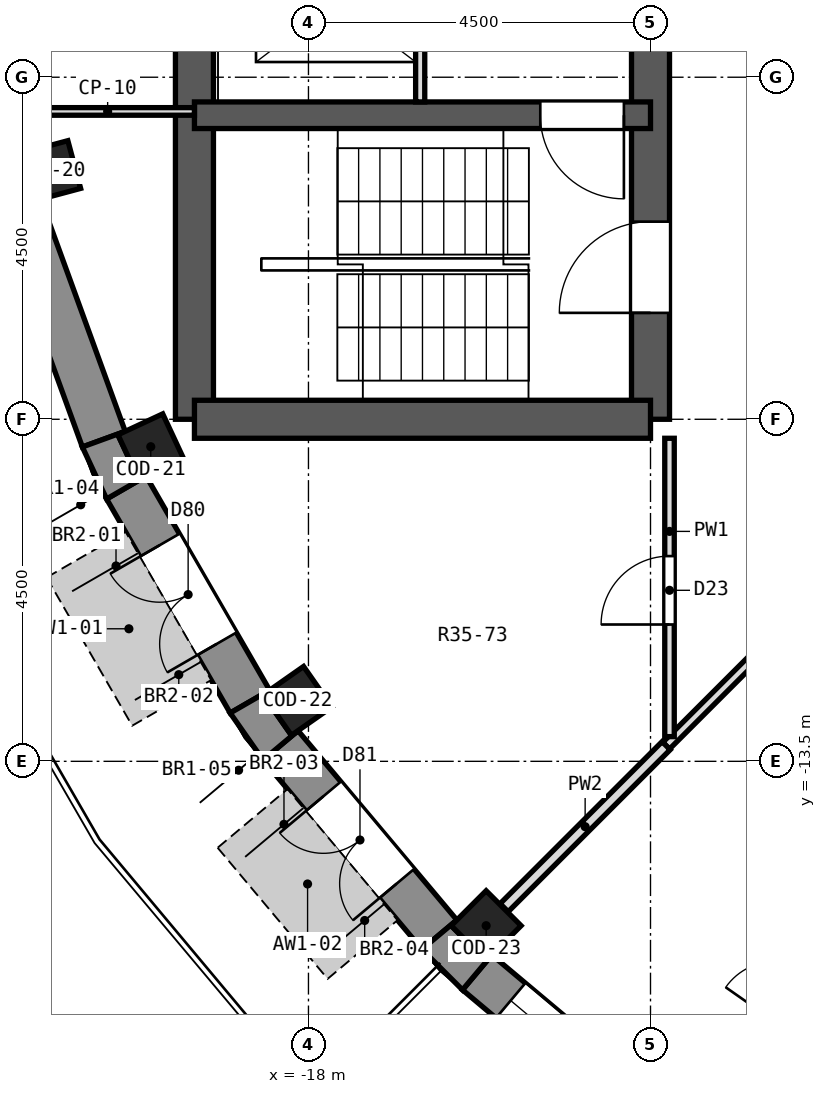
"""IFC4 building model, lengths in metres.
Left out: names, types, materials, properties, quantities, classifications, styles, units other than length and angle.
Written with IfcOpenShell. Run it as: python <this file> out.ifc"""

import sys

from ifc_helpers import new_model, si_unit, direction, frame, frame_2d, origin, origin_2d, place, context, subcontext, project, spatial, polyline, rectangle, outline, extrude, element, fill, save


model = new_model("IFC4")
c1 = context("Model", 3, precision=1e-05, world=origin(), true_north=direction((0.0, 1.0)))
c2 = subcontext(c1, "Body", "Model", "MODEL_VIEW")
j1 = project(units=[si_unit("LENGTHUNIT", "METRE"), si_unit("PLANEANGLEUNIT", "RADIAN")], contexts=[c1])
p1 = place(None, origin())
s1 = spatial("IfcSite", under=j1, at=p1, CompositionType="ELEMENT")
p2 = place(p1, origin())
s2 = spatial("IfcBuilding", under=s1, at=p2, CompositionType="ELEMENT")
p3 = place(p2, frame((0.0, 0.0, 249.5)))
s3 = spatial("IfcBuildingStorey", under=s2, at=p3, CompositionType="ELEMENT", Elevation=249.5)
for number, where, z_axis, x_axis in (
    (1, (-21.395, -5.733, 0.0), (0.0, 0.0, 1.0), (-0.966, -0.259, 0.0)),
    (2, (-20.075, -9.361, 0.0), (0.0, 0.0, 1.0), (-0.906, -0.423, 0.0)),
    (3, (-18.144, -12.705, 0.0), (0.0, 0.0, 1.0), (-0.819, -0.574, 0.0)),
    (4, (-15.662, -15.662, 0.0), (0.0, 0.0, 1.0), (-0.707, -0.707, 0.0)),
):
    element("IfcColumn", number, at=place(p3, frame(where, z_axis=z_axis, x_axis=x_axis)), inside=s3, PredefinedType="COLUMN", context=c2, shape_type="SweptSolid", body=[
        extrude(rectangle(XDim=0.65, YDim=0.65, at=origin_2d()), origin(), (0.0, 0.0, 1.0), 3.3),
    ])
p4 = place(p3, frame((-13.5, -9.0, 0.0), z_axis=(0.0, 0.0, 1.0), x_axis=(0.0, 1.0, 0.0)))
e5 = element("IfcWall", 5, at=p4, inside=s3, PredefinedType="SHEAR", context=c2, shape_type="SweptSolid", body=[
    extrude(rectangle(XDim=18.0, YDim=0.5, at=frame_2d((9.0, 0.0))), origin(), (0.0, 0.0, 1.0), 3.3),
])
p5 = place(p4, frame((15.4, 0.0, 0.0)))
e6 = element("IfcOpeningElement", 6, at=p5, cuts=e5, PredefinedType="OPENING", context=c2, shape_type="SweptSolid", body=[
    extrude(rectangle(XDim=1.2, YDim=2.1, at=frame_2d((0.6, 1.05))), frame((0.0, 0.262, 0.0), z_axis=(0.0, -1.0, 0.0), x_axis=(1.0, 0.0, 0.0)), (0.0, 0.0, 1.0), 0.524),
])
p6 = place(p4, frame((1.4, 0.0, 0.0)))
e7 = element("IfcOpeningElement", 7, at=p6, cuts=e5, PredefinedType="OPENING", context=c2, shape_type="SweptSolid", body=[
    extrude(rectangle(XDim=1.2, YDim=2.1, at=frame_2d((0.6, 1.05))), frame((0.0, 0.262, 0.0), z_axis=(0.0, -1.0, 0.0), x_axis=(1.0, 0.0, 0.0)), (0.0, 0.0, 1.0), 0.524),
])
p7 = place(p4, frame((7.5, 0.0, 0.0)))
e8 = element("IfcOpeningElement", 8, at=p7, cuts=e5, PredefinedType="OPENING", context=c2, shape_type="SweptSolid", body=[
    extrude(rectangle(XDim=3.0, YDim=2.4, at=frame_2d((1.5, 1.2))), frame((0.0, 0.262, 0.0), z_axis=(0.0, -1.0, 0.0), x_axis=(1.0, 0.0, 0.0)), (0.0, 0.0, 1.0), 0.524),
])
p8 = place(p3, frame((-19.5, -9.0, 0.0), z_axis=(0.0, 0.0, 1.0), x_axis=(0.0, 1.0, 0.0)))
e9 = element("IfcWall", 9, at=p8, inside=s3, PredefinedType="SHEAR", context=c2, shape_type="SweptSolid", body=[
    extrude(rectangle(XDim=18.0, YDim=0.5, at=frame_2d((9.0, 0.0))), origin(), (0.0, 0.0, 1.0), 3.3),
])
p9 = place(p8, frame((9.45, 0.0, 0.0)))
e10 = element("IfcOpeningElement", 10, at=p9, cuts=e9, PredefinedType="OPENING", context=c2, shape_type="SweptSolid", body=[
    extrude(rectangle(XDim=0.9, YDim=2.1, at=frame_2d((0.45, 1.05))), frame((0.0, 0.262, 0.0), z_axis=(0.0, -1.0, 0.0), x_axis=(1.0, 0.0, 0.0)), (0.0, 0.0, 1.0), 0.524),
])
p10 = place(p8, frame((7.65, 0.0, 0.0)))
e11 = element("IfcOpeningElement", 11, at=p10, cuts=e9, PredefinedType="OPENING", context=c2, shape_type="SweptSolid", body=[
    extrude(rectangle(XDim=0.9, YDim=2.1, at=frame_2d((0.45, 1.05))), frame((0.0, 0.262, 0.0), z_axis=(0.0, -1.0, 0.0), x_axis=(1.0, 0.0, 0.0)), (0.0, 0.0, 1.0), 0.524),
])
p11 = place(p3, frame((-13.5, -9.0, 0.0), z_axis=(0.0, 0.0, 1.0), x_axis=(-1.0, 0.0, 0.0)))
e12 = element("IfcWall", 12, at=p11, inside=s3, PredefinedType="SHEAR", context=c2, shape_type="SweptSolid", body=[
    extrude(rectangle(XDim=6.0, YDim=0.5, at=frame_2d((3.0, 0.0))), origin(), (0.0, 0.0, 1.0), 3.3),
])
p12 = place(p3, frame((-13.5, -5.0, 0.0), z_axis=(0.0, 0.0, 1.0), x_axis=(-1.0, 0.0, 0.0)))
e13 = element("IfcWall", 13, at=p12, inside=s3, PredefinedType="SHEAR", context=c2, shape_type="SweptSolid", body=[
    extrude(rectangle(XDim=6.0, YDim=0.35, at=frame_2d((3.0, 0.0))), origin(), (0.0, 0.0, 1.0), 3.3),
])
p13 = place(p12, frame((0.35, 0.0, 0.0)))
e14 = element("IfcOpeningElement", 14, at=p13, cuts=e13, PredefinedType="OPENING", context=c2, shape_type="SweptSolid", body=[
    extrude(rectangle(XDim=1.1, YDim=2.1, at=frame_2d((0.55, 1.05))), frame((0.0, 0.187, 0.0), z_axis=(0.0, -1.0, 0.0), x_axis=(1.0, 0.0, 0.0)), (0.0, 0.0, 1.0), 0.374),
])
p14 = place(p3, frame((-21.805, -6.206, 0.0), z_axis=(0.0, 0.0, 1.0), x_axis=(0.342056509473, -0.939679383794, 0.0)))
e15 = element("IfcWall", 15, at=p14, inside=s3, PredefinedType="SOLIDWALL", context=c2, shape_type="SweptSolid", body=[
    extrude(rectangle(XDim=3.252, YDim=0.6, at=frame_2d((1.626, 0.0))), origin(), (0.0, 0.0, 1.0), 2.9),
])
p15 = place(p3, frame((-20.396, -9.898, 0.0), z_axis=(0.0, 0.0, 1.0), x_axis=(0.500014901547, -0.866016800201, 0.0)))
e16 = element("IfcWall", 16, at=p15, inside=s3, PredefinedType="SOLIDWALL", context=c2, shape_type="SweptSolid", body=[
    extrude(rectangle(XDim=3.252, YDim=0.6, at=frame_2d((1.626, 0.0))), origin(), (0.0, 0.0, 1.0), 2.9),
])
p16 = place(p15, frame((0.876, 0.0, 0.0)))
e17 = element("IfcOpeningElement", 17, at=p16, cuts=e16, PredefinedType="OPENING", context=c2, shape_type="SweptSolid", body=[
    extrude(rectangle(XDim=1.5, YDim=2.4, at=frame_2d((0.75, 1.2))), frame((0.0, 0.312, 0.0), z_axis=(0.0, -1.0, 0.0), x_axis=(1.0, 0.0, 0.0)), (0.0, 0.0, 1.0), 0.624),
])
p17 = place(p3, frame((-18.367, -13.29, 0.0), z_axis=(0.0, 0.0, 1.0), x_axis=(0.64277291405, -0.766056773982, 0.0)))
e18 = element("IfcWall", 18, at=p17, inside=s3, PredefinedType="SOLIDWALL", context=c2, shape_type="SweptSolid", body=[
    extrude(rectangle(XDim=3.252, YDim=0.6, at=frame_2d((1.626, 0.0))), origin(), (0.0, 0.0, 1.0), 2.9),
])
p18 = place(p17, frame((0.876, 0.0, 0.0)))
e19 = element("IfcOpeningElement", 19, at=p18, cuts=e18, PredefinedType="OPENING", context=c2, shape_type="SweptSolid", body=[
    extrude(rectangle(XDim=1.5, YDim=2.4, at=frame_2d((0.75, 1.2))), frame((0.0, 0.312, 0.0), z_axis=(0.0, -1.0, 0.0), x_axis=(1.0, 0.0, 0.0)), (0.0, 0.0, 1.0), 0.624),
])
p19 = place(p3, frame((-15.781, -16.277, 0.0), z_axis=(0.0, 0.0, 1.0), x_axis=(0.766056773982, -0.64277291405, 0.0)))
e20 = element("IfcWall", 20, at=p19, inside=s3, PredefinedType="SOLIDWALL", context=c2, shape_type="SweptSolid", body=[
    extrude(rectangle(XDim=3.252, YDim=0.6, at=frame_2d((1.626, 0.0))), origin(), (0.0, 0.0, 1.0), 2.9),
])
p20 = place(p19, frame((0.576, 0.0, 0.9)))
e21 = element("IfcOpeningElement", 21, at=p20, cuts=e20, PredefinedType="OPENING", context=c2, shape_type="SweptSolid", body=[
    extrude(rectangle(XDim=2.1, YDim=1.8, at=frame_2d((1.05, 0.9))), frame((0.0, 0.312, 0.0), z_axis=(0.0, -1.0, 0.0), x_axis=(1.0, 0.0, 0.0)), (0.0, 0.0, 1.0), 0.624),
])
p21 = place(p3, origin())
e22 = element("IfcWall", 22, at=p21, inside=s3, PredefinedType="SOLIDWALL", context=c2, shape_type="SweptSolid", body=[
    extrude(outline(polyline([(-20.975, -9.364), (-20.656, -10.048), (-20.136, -9.748), (-20.232, -9.793), (-20.507, -9.204), (-20.411, -9.159), (-20.975, -9.364)])), origin(), (0.0, 0.0, 1.0), 2.9),
])
p22 = place(p3, origin())
e23 = element("IfcWall", 23, at=p22, inside=s3, PredefinedType="SOLIDWALL", context=c2, shape_type="SweptSolid", body=[
    extrude(outline(polyline([(-19.03, -12.864), (-18.597, -13.482), (-18.137, -13.097), (-18.224, -13.157), (-18.597, -12.625), (-18.51, -12.564), (-19.03, -12.864)])), origin(), (0.0, 0.0, 1.0), 2.9),
])
p23 = place(p3, origin())
e24 = element("IfcWall", 24, at=p23, inside=s3, PredefinedType="SOLIDWALL", context=c2, shape_type="SweptSolid", body=[
    extrude(outline(polyline([(-15.973, -16.507), (-15.588, -16.047), (-15.662, -16.122), (-16.122, -15.662), (-16.047, -15.588), (-16.507, -15.973), (-15.973, -16.507)])), origin(), (0.0, 0.0, 1.0), 2.9),
])
p24 = place(p3, frame((-13.294, -13.294, 0.0), z_axis=(0.0, 0.0, 1.0), x_axis=(0.707106781187, 0.707106781187, 0.0)))
e25 = element("IfcWall", 25, at=p24, inside=s3, PredefinedType="PARTITIONING", context=c2, shape_type="SweptSolid", body=[
    extrude(rectangle(XDim=4.545, YDim=0.125, at=frame_2d((2.273, 0.0))), origin(), (0.0, 0.0, 1.0), 2.9),
])
p25 = place(p3, frame((-15.426, -15.426, 0.0), z_axis=(0.0, 0.0, 1.0), x_axis=(0.707106781187, 0.707106781187, 0.0)))
e26 = element("IfcWall", 26, at=p25, inside=s3, PredefinedType="PARTITIONING", context=c2, shape_type="SweptSolid", body=[
    extrude(rectangle(XDim=3.014, YDim=0.15, at=frame_2d((1.507, 0.0))), origin(), (0.0, 0.0, 1.0), 2.9),
])
p26 = place(p3, frame((-12.513, -17.87, 0.0), z_axis=(0.0, 0.0, 1.0), x_axis=(0.573815640039, 0.818984500004, 0.0)))
e27 = element("IfcWall", 27, at=p26, inside=s3, PredefinedType="PARTITIONING", context=c2, shape_type="SweptSolid", body=[
    extrude(rectangle(XDim=4.173, YDim=0.125, at=frame_2d((2.087, 0.0))), origin(), (0.0, 0.0, 1.0), 2.9),
])
p27 = place(p26, frame((1.146, 0.0, 0.0)))
e28 = element("IfcOpeningElement", 28, at=p27, cuts=e27, PredefinedType="OPENING", context=c2, shape_type="SweptSolid", body=[
    extrude(rectangle(XDim=0.8, YDim=2.1, at=frame_2d((0.4, 1.05))), frame((0.0, 0.074, 0.0), z_axis=(0.0, -1.0, 0.0), x_axis=(1.0, 0.0, 0.0)), (0.0, 0.0, 1.0), 0.149),
])
p28 = place(p3, frame((-13.25, -13.175, 0.0), z_axis=(0.0, 0.0, 1.0), x_axis=(0.0, 1.0, 0.0)))
e29 = element("IfcWall", 29, at=p28, inside=s3, PredefinedType="PARTITIONING", context=c2, shape_type="SweptSolid", body=[
    extrude(rectangle(XDim=3.925, YDim=0.125, at=frame_2d((1.962, 0.0))), origin(), (0.0, 0.0, 1.0), 2.9),
])
p29 = place(p28, frame((1.475, 0.0, 0.0)))
e30 = element("IfcOpeningElement", 30, at=p29, cuts=e29, PredefinedType="OPENING", context=c2, shape_type="SweptSolid", body=[
    extrude(rectangle(XDim=0.9, YDim=2.1, at=frame_2d((0.45, 1.05))), frame((0.0, 0.074, 0.0), z_axis=(0.0, -1.0, 0.0), x_axis=(1.0, 0.0, 0.0)), (0.0, 0.0, 1.0), 0.149),
])
p30 = place(p3, frame((-19.5, -4.95, 0.0), z_axis=(0.0, 0.0, 1.0), x_axis=(-1.0, 0.0, 0.0)))
e31 = element("IfcWall", 31, at=p30, inside=s3, PredefinedType="PARTITIONING", context=c2, shape_type="SweptSolid", body=[
    extrude(rectangle(XDim=2.284, YDim=0.1, at=frame_2d((1.142, 0.0))), origin(), (0.0, 0.0, 1.0), 2.9),
])
p31 = place(p3, frame((-16.53, -4.825, 0.0), z_axis=(0.0, 0.0, 1.0), x_axis=(0.0, 1.0, 0.0)))
e32 = element("IfcWall", 32, at=p31, inside=s3, PredefinedType="PARTITIONING", context=c2, shape_type="SweptSolid", body=[
    extrude(rectangle(XDim=2.65, YDim=0.12, at=frame_2d((1.325, 0.0))), origin(), (0.0, 0.0, 1.0), 2.9),
])
p32 = place(p31, frame((0.775, 0.0, 0.0)))
e33 = element("IfcOpeningElement", 33, at=p32, cuts=e32, PredefinedType="OPENING", context=c2, shape_type="SweptSolid", body=[
    extrude(rectangle(XDim=1.1, YDim=2.1, at=frame_2d((0.55, 1.05))), frame((0.0, 0.072, 0.0), z_axis=(0.0, -1.0, 0.0), x_axis=(1.0, 0.0, 0.0)), (0.0, 0.0, 1.0), 0.144),
])
p33 = place(p16, frame((1.5, 0.0, 0.0), z_axis=(0.0, 0.0, 1.0), x_axis=(-1.0, 0.0, 0.0)))
e34 = element("IfcDoor", 34, at=p33, inside=s3, OperationType="DOUBLE_DOOR_SINGLE_SWING", PredefinedType="DOOR", context=c2, shape_type="SweptSolid", body=[
    extrude(rectangle(XDim=1.5, YDim=2.4, at=frame_2d((0.75, 1.2))), frame((0.0, -0.075, 0.0), z_axis=(0.0, -1.0, 0.0), x_axis=(1.0, 0.0, 0.0)), (0.0, 0.0, 1.0), 0.05),
])
fill(e17, e34)
p34 = place(p18, frame((1.5, 0.0, 0.0), z_axis=(0.0, 0.0, 1.0), x_axis=(-1.0, 0.0, 0.0)))
e35 = element("IfcDoor", 35, at=p34, inside=s3, OperationType="DOUBLE_DOOR_SINGLE_SWING", PredefinedType="DOOR", context=c2, shape_type="SweptSolid", body=[
    extrude(rectangle(XDim=1.5, YDim=2.4, at=frame_2d((0.75, 1.2))), frame((0.0, -0.075, 0.0), z_axis=(0.0, -1.0, 0.0), x_axis=(1.0, 0.0, 0.0)), (0.0, 0.0, 1.0), 0.05),
])
fill(e19, e35)
p35 = place(p20, origin())
e36 = element("IfcWindow", 36, at=p35, inside=s3, PartitioningType="SINGLE_PANEL", PredefinedType="WINDOW", context=c2, shape_type="SweptSolid", body=[
    extrude(rectangle(XDim=2.1, YDim=1.8, at=frame_2d((1.05, 0.9))), frame((0.0, 0.18, 0.0), z_axis=(0.0, -1.0, 0.0), x_axis=(1.0, 0.0, 0.0)), (0.0, 0.0, 1.0), 0.06),
])
fill(e21, e36)
p36 = place(p29, origin())
e37 = element("IfcDoor", 37, at=p36, inside=s3, OperationType="SINGLE_SWING_LEFT", PredefinedType="DOOR", context=c2, shape_type="SweptSolid", body=[
    extrude(rectangle(XDim=0.9, YDim=2.1, at=frame_2d((0.45, 1.05))), frame((0.0, 0.025, 0.0), z_axis=(0.0, -1.0, 0.0), x_axis=(1.0, 0.0, 0.0)), (0.0, 0.0, 1.0), 0.05),
])
fill(e30, e37)
p37 = place(p13, origin())
e38 = element("IfcDoor", 38, at=p37, inside=s3, OperationType="SINGLE_SWING_LEFT", PredefinedType="DOOR", context=c2, shape_type="SweptSolid", body=[
    extrude(rectangle(XDim=1.1, YDim=2.1, at=frame_2d((0.55, 1.05))), frame((0.0, 0.025, 0.0), z_axis=(0.0, -1.0, 0.0), x_axis=(1.0, 0.0, 0.0)), (0.0, 0.0, 1.0), 0.05),
])
fill(e14, e38)
p38 = place(p6, origin())
e39 = element("IfcDoor", 39, at=p38, inside=s3, OperationType="SINGLE_SWING_LEFT", PredefinedType="DOOR", context=c2, shape_type="SweptSolid", body=[
    extrude(rectangle(XDim=1.2, YDim=2.1, at=frame_2d((0.6, 1.05))), frame((0.0, 0.025, 0.0), z_axis=(0.0, -1.0, 0.0), x_axis=(1.0, 0.0, 0.0)), (0.0, 0.0, 1.0), 0.05),
])
fill(e7, e39)
save(model, sys.argv[1])
